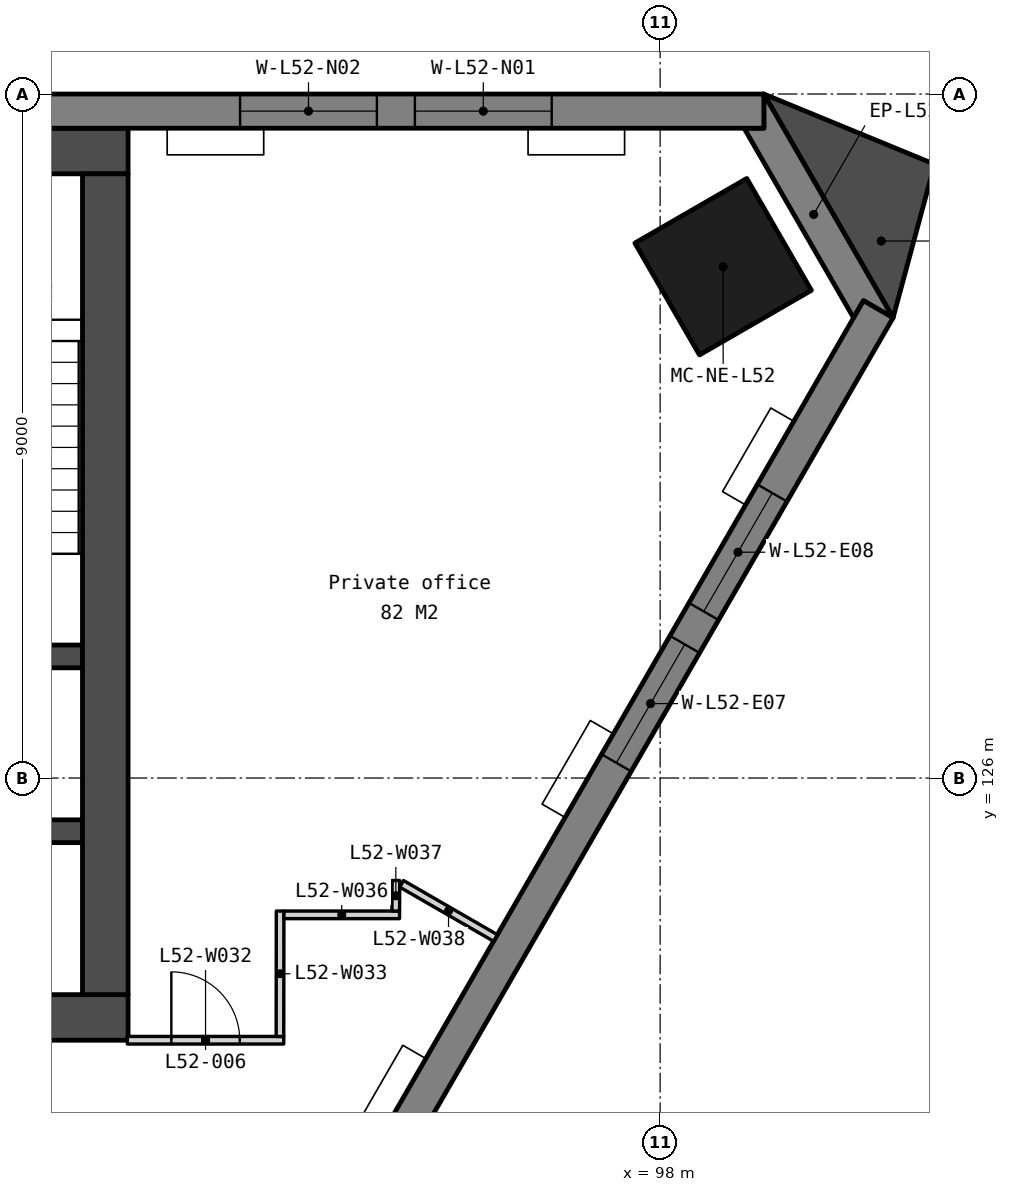
"""IFC4 building model, lengths in metres.
Left out: names, types, materials, properties, quantities, classifications, styles, units other than length and angle.
Written with IfcOpenShell. Run it as: python <this file> out.ifc"""

import sys

from ifc_helpers import new_model, si_unit, direction, frame, frame_2d, origin, origin_2d, place, context, subcontext, project, spatial, polyline, rectangle, outline, extrude, element, fill, save


model = new_model("IFC4")
c1 = context("Model", 3, precision=1e-05, world=origin(), true_north=direction((0.0, 1.0)))
c2 = subcontext(c1, "Body", "Model", "MODEL_VIEW")
j1 = project(units=[si_unit("LENGTHUNIT", "METRE"), si_unit("PLANEANGLEUNIT", "RADIAN")], contexts=[c1])
p1 = place(None, origin())
s1 = spatial("IfcSite", under=j1, at=p1, CompositionType="ELEMENT")
p2 = place(p1, origin())
s2 = spatial("IfcBuilding", under=s1, at=p2, CompositionType="ELEMENT")
p3 = place(p2, frame((0.0, 0.0, 207.5)))
s3 = spatial("IfcBuildingStorey", under=s2, at=p3, CompositionType="ELEMENT", Elevation=207.5)
p4 = place(p3, frame((98.829, 132.728, 0.0), z_axis=(0.0, 0.0, 1.0), x_axis=(-0.5, 0.866025403784, 0.0)))
e1 = element("IfcColumn", 1, at=p4, inside=s3, PredefinedType="COLUMN", context=c2, shape_type="SweptSolid", body=[
    extrude(rectangle(XDim=1.7, YDim=1.7, at=origin_2d()), origin(), (0.0, 0.0, 1.0), 3.9),
])
p5 = place(p3, frame((69.0, 134.25, 0.0), z_axis=(0.0, 0.0, 1.0), x_axis=(1.0, 0.0, 0.0)))
e2 = element("IfcWall", 2, at=p5, inside=s3, PredefinedType="SOLIDWALL", context=c2, shape_type="SweptSolid", body=[
    extrude(rectangle(XDim=22.0, YDim=0.6, at=frame_2d((11.0, 0.0))), origin(), (0.0, 0.0, 1.0), 3.75),
])
p6 = place(p3, frame((69.0, 122.85, 0.0), z_axis=(0.0, 0.0, 1.0), x_axis=(1.0, 0.0, 0.0)))
e3 = element("IfcWall", 3, at=p6, inside=s3, PredefinedType="SOLIDWALL", context=c2, shape_type="SweptSolid", body=[
    extrude(rectangle(XDim=22.0, YDim=0.6, at=frame_2d((11.0, 0.0))), origin(), (0.0, 0.0, 1.0), 3.75),
])
p7 = place(p6, frame((16.375, 0.0, 0.0)))
e4 = element("IfcOpeningElement", 4, at=p7, cuts=e3, PredefinedType="OPENING", context=c2, shape_type="SweptSolid", body=[
    extrude(rectangle(XDim=1.8, YDim=2.1, at=frame_2d((0.9, 1.05))), frame((0.0, 0.31, 0.0), z_axis=(0.0, -1.0, 0.0), x_axis=(1.0, 0.0, 0.0)), (0.0, 0.0, 1.0), 0.62),
])
p8 = place(p6, frame((3.825, 0.0, 0.0)))
e5 = element("IfcOpeningElement", 5, at=p8, cuts=e3, PredefinedType="OPENING", context=c2, shape_type="SweptSolid", body=[
    extrude(rectangle(XDim=1.8, YDim=2.1, at=frame_2d((0.9, 1.05))), frame((0.0, 0.31, 0.0), z_axis=(0.0, -1.0, 0.0), x_axis=(1.0, 0.0, 0.0)), (0.0, 0.0, 1.0), 0.62),
])
p9 = place(p6, frame((12.85, 0.0, 0.0)))
e6 = element("IfcOpeningElement", 6, at=p9, cuts=e3, PredefinedType="OPENING", context=c2, shape_type="SweptSolid", body=[
    extrude(rectangle(XDim=1.5, YDim=2.1, at=frame_2d((0.75, 1.05))), frame((0.0, 0.31, 0.0), z_axis=(0.0, -1.0, 0.0), x_axis=(1.0, 0.0, 0.0)), (0.0, 0.0, 1.0), 0.62),
])
for number, where, z_axis, x_axis in (
    (7, (87.85, 127.6, 0.0), (0.0, 0.0, 1.0), (1.0, 0.0, 0.0)),
    (8, (87.85, 125.3, 0.0), (0.0, 0.0, 1.0), (1.0, 0.0, 0.0)),
):
    element("IfcWall", number, at=place(p3, frame(where, z_axis=z_axis, x_axis=x_axis)), inside=s3, PredefinedType="SOLIDWALL", context=c2, shape_type="SweptSolid", body=[
        extrude(rectangle(XDim=2.55, YDim=0.3, at=frame_2d((1.275, 0.0))), origin(), (0.0, 0.0, 1.0), 3.75),
    ])
p10 = place(p3, frame((90.7, 133.95, 0.0), z_axis=(0.0, 0.0, 1.0), x_axis=(0.0, -1.0, 0.0)))
e9 = element("IfcWall", 9, at=p10, inside=s3, PredefinedType="SOLIDWALL", context=c2, shape_type="SweptSolid", body=[
    extrude(rectangle(XDim=10.8, YDim=0.6, at=frame_2d((5.4, 0.0))), origin(), (0.0, 0.0, 1.0), 3.75),
])
p11 = place(p3, frame((0.0, 0.0, -0.15)))
e10 = element("IfcWall", 10, at=p11, inside=s3, PredefinedType="SOLIDWALL", context=c2, shape_type="SweptSolid", body=[
    extrude(outline(polyline([(101.065, 132.055), (100.675, 132.281), (100.545, 132.055), (99.105, 134.55), (99.365, 134.55), (99.365, 135.0), (101.065, 132.055)])), origin(), (0.0, 0.0, 1.0), 3.9),
])
p12 = place(p3, frame((99.365, 134.775, -0.15), z_axis=(0.0, 0.0, 1.0), x_axis=(-1.0, 0.0, 0.0)))
e11 = element("IfcWall", 11, at=p12, inside=s3, PredefinedType="SOLIDWALL", context=c2, shape_type="SweptSolid", body=[
    extrude(outline(polyline([(38.729, 0.0), (38.729, 3.9), (0.0, 3.9), (0.0, 0.0), (38.729, 0.0)])), frame((0.0, 0.225, 0.0), z_axis=(0.0, -1.0, 0.0), x_axis=(1.0, 0.0, 0.0)), (0.0, 0.0, 1.0), 0.45),
])
p13 = place(p12, frame((2.791, 0.0, 0.95)))
e12 = element("IfcOpeningElement", 12, at=p13, cuts=e11, PredefinedType="OPENING", context=c2, shape_type="SweptSolid", body=[
    extrude(rectangle(XDim=1.8, YDim=2.2, at=frame_2d((0.9, 1.1))), frame((0.0, 0.235, 0.0), z_axis=(0.0, -1.0, 0.0), x_axis=(1.0, 0.0, 0.0)), (0.0, 0.0, 1.0), 0.47),
])
p14 = place(p12, frame((5.091, 0.0, 0.95)))
e13 = element("IfcOpeningElement", 13, at=p14, cuts=e11, PredefinedType="OPENING", context=c2, shape_type="SweptSolid", body=[
    extrude(rectangle(XDim=1.8, YDim=2.2, at=frame_2d((0.9, 1.1))), frame((0.0, 0.235, 0.0), z_axis=(0.0, -1.0, 0.0), x_axis=(1.0, 0.0, 0.0)), (0.0, 0.0, 1.0), 0.47),
])
p15 = place(p12, frame((12.473, 0.0, 0.95)))
e14 = element("IfcOpeningElement", 14, at=p15, cuts=e11, PredefinedType="OPENING", context=c2, shape_type="SweptSolid", body=[
    extrude(rectangle(XDim=1.8, YDim=2.2, at=frame_2d((0.9, 1.1))), frame((0.0, 0.235, 0.0), z_axis=(0.0, -1.0, 0.0), x_axis=(1.0, 0.0, 0.0)), (0.0, 0.0, 1.0), 0.47),
])
p16 = place(p12, frame((14.773, 0.0, 0.95)))
e15 = element("IfcOpeningElement", 15, at=p16, cuts=e11, PredefinedType="OPENING", context=c2, shape_type="SweptSolid", body=[
    extrude(rectangle(XDim=1.8, YDim=2.2, at=frame_2d((0.9, 1.1))), frame((0.0, 0.235, 0.0), z_axis=(0.0, -1.0, 0.0), x_axis=(1.0, 0.0, 0.0)), (0.0, 0.0, 1.0), 0.47),
])
p17 = place(p12, frame((22.156, 0.0, 0.95)))
e16 = element("IfcOpeningElement", 16, at=p17, cuts=e11, PredefinedType="OPENING", context=c2, shape_type="SweptSolid", body=[
    extrude(rectangle(XDim=1.8, YDim=2.2, at=frame_2d((0.9, 1.1))), frame((0.0, 0.235, 0.0), z_axis=(0.0, -1.0, 0.0), x_axis=(1.0, 0.0, 0.0)), (0.0, 0.0, 1.0), 0.47),
])
p18 = place(p12, frame((24.456, 0.0, 0.95)))
e17 = element("IfcOpeningElement", 17, at=p18, cuts=e11, PredefinedType="OPENING", context=c2, shape_type="SweptSolid", body=[
    extrude(rectangle(XDim=1.8, YDim=2.2, at=frame_2d((0.9, 1.1))), frame((0.0, 0.235, 0.0), z_axis=(0.0, -1.0, 0.0), x_axis=(1.0, 0.0, 0.0)), (0.0, 0.0, 1.0), 0.47),
])
p19 = place(p12, frame((31.838, 0.0, 0.95)))
e18 = element("IfcOpeningElement", 18, at=p19, cuts=e11, PredefinedType="OPENING", context=c2, shape_type="SweptSolid", body=[
    extrude(rectangle(XDim=1.8, YDim=2.2, at=frame_2d((0.9, 1.1))), frame((0.0, 0.235, 0.0), z_axis=(0.0, -1.0, 0.0), x_axis=(1.0, 0.0, 0.0)), (0.0, 0.0, 1.0), 0.47),
])
p20 = place(p12, frame((34.138, 0.0, 0.95)))
e19 = element("IfcOpeningElement", 19, at=p20, cuts=e11, PredefinedType="OPENING", context=c2, shape_type="SweptSolid", body=[
    extrude(rectangle(XDim=1.8, YDim=2.2, at=frame_2d((0.9, 1.1))), frame((0.0, 0.235, 0.0), z_axis=(0.0, -1.0, 0.0), x_axis=(1.0, 0.0, 0.0)), (0.0, 0.0, 1.0), 0.47),
])
p21 = place(p3, frame((81.505, 98.627, -0.15), z_axis=(0.0, 0.0, 1.0), x_axis=(0.500002199942, 0.866024133644, 0.0)))
e20 = element("IfcWall", 20, at=p21, inside=s3, PredefinedType="SOLIDWALL", context=c2, shape_type="SweptSolid", body=[
    extrude(outline(polyline([(38.729, 0.0), (38.729, 3.9), (0.0, 3.9), (0.0, 0.0), (38.729, 0.0)])), frame((0.0, 0.225, 0.0), z_axis=(0.0, -1.0, 0.0), x_axis=(1.0, 0.0, 0.0)), (0.0, 0.0, 1.0), 0.45),
])
p22 = place(p21, frame((2.791, 0.0, 0.95)))
e21 = element("IfcOpeningElement", 21, at=p22, cuts=e20, PredefinedType="OPENING", context=c2, shape_type="SweptSolid", body=[
    extrude(rectangle(XDim=1.8, YDim=2.2, at=frame_2d((0.9, 1.1))), frame((0.0, 0.235, 0.0), z_axis=(0.0, -1.0, 0.0), x_axis=(1.0, 0.0, 0.0)), (0.0, 0.0, 1.0), 0.47),
])
p23 = place(p21, frame((5.091, 0.0, 0.95)))
e22 = element("IfcOpeningElement", 22, at=p23, cuts=e20, PredefinedType="OPENING", context=c2, shape_type="SweptSolid", body=[
    extrude(rectangle(XDim=1.8, YDim=2.2, at=frame_2d((0.9, 1.1))), frame((0.0, 0.235, 0.0), z_axis=(0.0, -1.0, 0.0), x_axis=(1.0, 0.0, 0.0)), (0.0, 0.0, 1.0), 0.47),
])
p24 = place(p21, frame((12.473, 0.0, 0.95)))
e23 = element("IfcOpeningElement", 23, at=p24, cuts=e20, PredefinedType="OPENING", context=c2, shape_type="SweptSolid", body=[
    extrude(rectangle(XDim=1.8, YDim=2.2, at=frame_2d((0.9, 1.1))), frame((0.0, 0.235, 0.0), z_axis=(0.0, -1.0, 0.0), x_axis=(1.0, 0.0, 0.0)), (0.0, 0.0, 1.0), 0.47),
])
p25 = place(p21, frame((14.773, 0.0, 0.95)))
e24 = element("IfcOpeningElement", 24, at=p25, cuts=e20, PredefinedType="OPENING", context=c2, shape_type="SweptSolid", body=[
    extrude(rectangle(XDim=1.8, YDim=2.2, at=frame_2d((0.9, 1.1))), frame((0.0, 0.235, 0.0), z_axis=(0.0, -1.0, 0.0), x_axis=(1.0, 0.0, 0.0)), (0.0, 0.0, 1.0), 0.47),
])
p26 = place(p21, frame((22.156, 0.0, 0.95)))
e25 = element("IfcOpeningElement", 25, at=p26, cuts=e20, PredefinedType="OPENING", context=c2, shape_type="SweptSolid", body=[
    extrude(rectangle(XDim=1.8, YDim=2.2, at=frame_2d((0.9, 1.1))), frame((0.0, 0.235, 0.0), z_axis=(0.0, -1.0, 0.0), x_axis=(1.0, 0.0, 0.0)), (0.0, 0.0, 1.0), 0.47),
])
p27 = place(p21, frame((24.456, 0.0, 0.95)))
e26 = element("IfcOpeningElement", 26, at=p27, cuts=e20, PredefinedType="OPENING", context=c2, shape_type="SweptSolid", body=[
    extrude(rectangle(XDim=1.8, YDim=2.2, at=frame_2d((0.9, 1.1))), frame((0.0, 0.235, 0.0), z_axis=(0.0, -1.0, 0.0), x_axis=(1.0, 0.0, 0.0)), (0.0, 0.0, 1.0), 0.47),
])
p28 = place(p21, frame((31.838, 0.0, 0.95)))
e27 = element("IfcOpeningElement", 27, at=p28, cuts=e20, PredefinedType="OPENING", context=c2, shape_type="SweptSolid", body=[
    extrude(rectangle(XDim=1.8, YDim=2.2, at=frame_2d((0.9, 1.1))), frame((0.0, 0.235, 0.0), z_axis=(0.0, -1.0, 0.0), x_axis=(1.0, 0.0, 0.0)), (0.0, 0.0, 1.0), 0.47),
])
p29 = place(p21, frame((34.138, 0.0, 0.95)))
e28 = element("IfcOpeningElement", 28, at=p29, cuts=e20, PredefinedType="OPENING", context=c2, shape_type="SweptSolid", body=[
    extrude(rectangle(XDim=1.8, YDim=2.2, at=frame_2d((0.9, 1.1))), frame((0.0, 0.235, 0.0), z_axis=(0.0, -1.0, 0.0), x_axis=(1.0, 0.0, 0.0)), (0.0, 0.0, 1.0), 0.47),
])
p30 = place(p3, frame((0.0, 0.0, -0.15)))
e29 = element("IfcWall", 29, at=p30, inside=s3, PredefinedType="SOLIDWALL", context=c2, shape_type="SweptSolid", body=[
    extrude(outline(polyline([(101.065, 132.055), (101.61, 134.076), (99.365, 135.0), (101.065, 132.055)])), origin(), (0.0, 0.0, 1.0), 3.9),
])
p31 = place(p3, frame((90.99, 122.55, 0.0), z_axis=(0.0, 0.0, 1.0), x_axis=(1.0, 0.0, 0.0)))
e30 = element("IfcWall", 30, at=p31, inside=s3, PredefinedType="PARTITIONING", context=c2, shape_type="SweptSolid", body=[
    extrude(rectangle(XDim=2.058, YDim=0.1, at=frame_2d((1.029, 0.0))), origin(), (0.0, 0.0, 1.0), 3.75),
])
p32 = place(p31, frame((0.579, 0.0, 0.0)))
e31 = element("IfcOpeningElement", 31, at=p32, cuts=e30, PredefinedType="OPENING", context=c2, shape_type="SweptSolid", body=[
    extrude(rectangle(XDim=0.9, YDim=2.1, at=frame_2d((0.45, 1.05))), frame((0.0, 0.06, 0.0), z_axis=(0.0, -1.0, 0.0), x_axis=(1.0, 0.0, 0.0)), (0.0, 0.0, 1.0), 0.12),
])
p33 = place(p3, frame((92.998, 122.6, 0.0), z_axis=(0.0, 0.0, 1.0), x_axis=(0.001183781355, 0.999999299331, 0.0)))
e32 = element("IfcWall", 32, at=p33, inside=s3, PredefinedType="PARTITIONING", context=c2, shape_type="SweptSolid", body=[
    extrude(rectangle(XDim=1.65, YDim=0.1, at=frame_2d((0.825, 0.0))), origin(), (0.0, 0.0, 1.0), 3.75),
])
p34 = place(p3, frame((93.05, 124.2, 0.0), z_axis=(0.0, 0.0, 1.0), x_axis=(1.0, 0.0, 0.0)))
e33 = element("IfcWall", 33, at=p34, inside=s3, PredefinedType="PARTITIONING", context=c2, shape_type="SweptSolid", body=[
    extrude(rectangle(XDim=1.521, YDim=0.1, at=frame_2d((0.761, 0.0))), origin(), (0.0, 0.0, 1.0), 3.28),
])
p35 = place(p3, frame((94.522, 124.25, 0.0), z_axis=(0.0, 0.0, 1.0), x_axis=(0.004252695444, 0.99999095725, 0.0)))
e34 = element("IfcWall", 34, at=p35, inside=s3, PredefinedType="PARTITIONING", context=c2, shape_type="SweptSolid", body=[
    extrude(rectangle(XDim=0.402, YDim=0.1, at=frame_2d((0.201, 0.0))), origin(), (0.0, 0.0, 1.0), 3.75),
])
p36 = place(p3, frame((94.598, 124.609, 0.0), z_axis=(0.0, 0.0, 1.0), x_axis=(0.866097252637, -0.499875533482, 0.0)))
e35 = element("IfcWall", 35, at=p36, inside=s3, PredefinedType="PARTITIONING", context=c2, shape_type="SweptSolid", body=[
    extrude(rectangle(XDim=1.427, YDim=0.1, at=frame_2d((0.713, 0.0))), origin(), (0.0, 0.0, 1.0), 3.75),
])
p37 = place(p13, origin())
e36 = element("IfcWindow", 36, at=p37, inside=s3, PartitioningType="SINGLE_PANEL", PredefinedType="WINDOW", context=c2, shape_type="SweptSolid", body=[
    extrude(rectangle(XDim=1.8, YDim=2.2, at=frame_2d((0.9, 1.1))), frame((0.0, 0.03, 0.0), z_axis=(0.0, -1.0, 0.0), x_axis=(1.0, 0.0, 0.0)), (0.0, 0.0, 1.0), 0.06),
])
fill(e12, e36)
p38 = place(p14, origin())
e37 = element("IfcWindow", 37, at=p38, inside=s3, PartitioningType="SINGLE_PANEL", PredefinedType="WINDOW", context=c2, shape_type="SweptSolid", body=[
    extrude(rectangle(XDim=1.8, YDim=2.2, at=frame_2d((0.9, 1.1))), frame((0.0, 0.03, 0.0), z_axis=(0.0, -1.0, 0.0), x_axis=(1.0, 0.0, 0.0)), (0.0, 0.0, 1.0), 0.06),
])
fill(e13, e37)
p39 = place(p28, origin())
e38 = element("IfcWindow", 38, at=p39, inside=s3, PartitioningType="SINGLE_PANEL", PredefinedType="WINDOW", context=c2, shape_type="SweptSolid", body=[
    extrude(rectangle(XDim=1.8, YDim=2.2, at=frame_2d((0.9, 1.1))), frame((0.0, 0.03, 0.0), z_axis=(0.0, -1.0, 0.0), x_axis=(1.0, 0.0, 0.0)), (0.0, 0.0, 1.0), 0.06),
])
fill(e27, e38)
p40 = place(p29, origin())
e39 = element("IfcWindow", 39, at=p40, inside=s3, PartitioningType="SINGLE_PANEL", PredefinedType="WINDOW", context=c2, shape_type="SweptSolid", body=[
    extrude(rectangle(XDim=1.8, YDim=2.2, at=frame_2d((0.9, 1.1))), frame((0.0, 0.03, 0.0), z_axis=(0.0, -1.0, 0.0), x_axis=(1.0, 0.0, 0.0)), (0.0, 0.0, 1.0), 0.06),
])
fill(e28, e39)
p41 = place(p32, origin())
e40 = element("IfcDoor", 40, at=p41, inside=s3, OperationType="SINGLE_SWING_LEFT", PredefinedType="DOOR", context=c2, shape_type="SweptSolid", body=[
    extrude(rectangle(XDim=0.9, YDim=2.1, at=frame_2d((0.45, 1.05))), frame((0.0, 0.025, 0.0), z_axis=(0.0, -1.0, 0.0), x_axis=(1.0, 0.0, 0.0)), (0.0, 0.0, 1.0), 0.05),
])
fill(e31, e40)
save(model, sys.argv[1])
